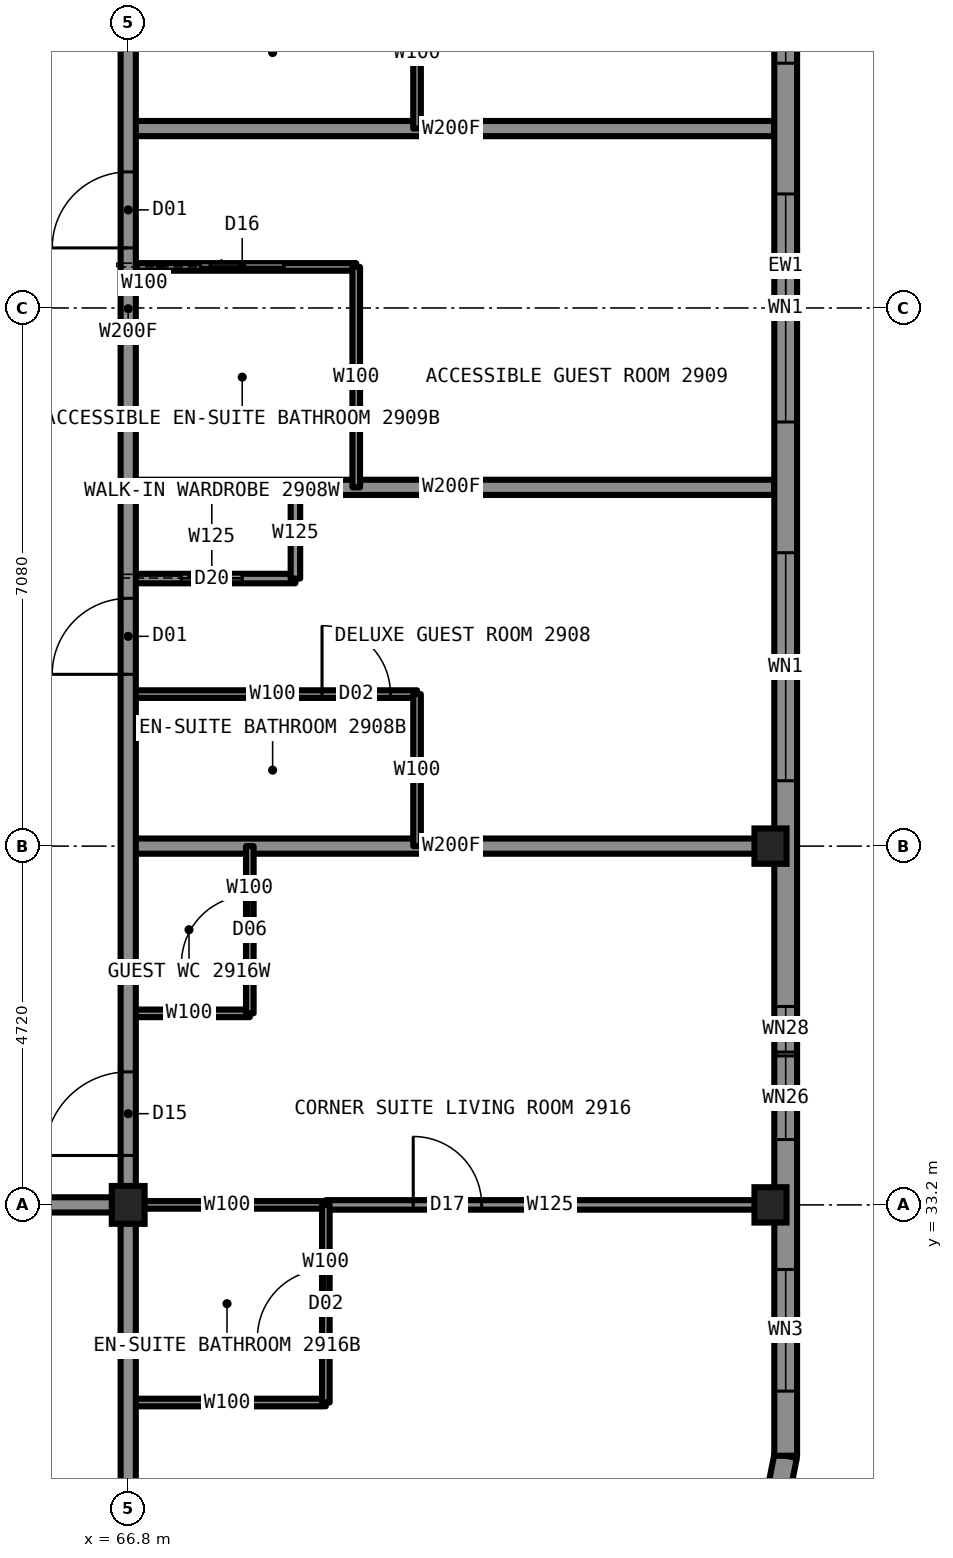
"""IFC4 building model, lengths in metres.
Left out: names, types, materials, properties, quantities, classifications, styles, units other than length and angle.
Written with IfcOpenShell. Run it as: python <this file> out.ifc"""

import sys

from ifc_helpers import new_model, si_unit, direction, frame, frame_2d, origin, origin_2d, place, context, subcontext, project, spatial, rectangle, i_section, extrude, element, fill, save


model = new_model("IFC4")
c1 = context("Model", 3, precision=1e-05, world=origin(), true_north=direction((0.0, 1.0)))
c2 = subcontext(c1, "Body", "Model", "MODEL_VIEW")
j1 = project(units=[si_unit("LENGTHUNIT", "METRE"), si_unit("PLANEANGLEUNIT", "RADIAN")], contexts=[c1])
p1 = place(None, origin())
s1 = spatial("IfcSite", under=j1, at=p1, CompositionType="ELEMENT")
p2 = place(p1, origin())
s2 = spatial("IfcBuilding", under=s1, at=p2, CompositionType="ELEMENT")
p3 = place(p2, frame((0.0, 0.0, 103.9)))
s3 = spatial("IfcBuildingStorey", under=s2, at=p3, CompositionType="ELEMENT", Elevation=103.9)
for number, where, z_axis, x_axis in (
    (1, (75.25, 33.2, 0.0), (0.0, 0.0, 1.0), (1.0, 0.0, 0.0)),
    (2, (75.25, 37.92, 0.0), (0.0, 0.0, 1.0), (1.0, 0.0, 0.0)),
):
    element("IfcColumn", number, at=place(p3, frame(where, z_axis=z_axis, x_axis=x_axis)), inside=s3, PredefinedType="COLUMN", context=c2, shape_type="SweptSolid", body=[
        extrude(i_section(OverallWidth=0.422, OverallDepth=0.465, WebThickness=0.045, FlangeThickness=0.073, at=origin_2d()), origin(), (0.0, 0.0, 1.0), 3.5),
    ])
p4 = place(p3, frame((66.8, 33.2, 0.0), z_axis=(0.0, 0.0, 1.0), x_axis=(1.0, 0.0, 0.0)))
e3 = element("IfcColumn", 3, at=p4, inside=s3, PredefinedType="COLUMN", context=c2, shape_type="SweptSolid", body=[
    extrude(i_section(OverallWidth=0.432, OverallDepth=0.498, WebThickness=0.056, FlangeThickness=0.089, at=origin_2d()), origin(), (0.0, 0.0, 1.0), 3.5),
])
p5 = place(p3, frame((66.8, 33.2, 0.0), z_axis=(0.0, 0.0, 1.0), x_axis=(1.0, 0.0, 0.0)))
e4 = element("IfcWall", 4, at=p5, inside=s3, PredefinedType="PARTITIONING", context=c2, shape_type="SweptSolid", body=[
    extrude(rectangle(XDim=2.6, YDim=0.1, at=frame_2d((1.3, 0.0))), origin(), (0.0, 0.0, 1.0), 2.573),
])
p6 = place(p3, frame((43.2, 33.2, 0.0), z_axis=(0.0, 0.0, 1.0), x_axis=(1.0, 0.0, 0.0)))
e5 = element("IfcWall", 5, at=p6, inside=s3, PredefinedType="PARTITIONING", context=c2, shape_type="SweptSolid", body=[
    extrude(rectangle(XDim=23.6, YDim=0.2, at=frame_2d((11.8, 0.0))), origin(), (0.0, 0.0, 1.0), 3.33),
])
p7 = place(p6, frame((3.0, 0.0, 0.0)))
e6 = element("IfcOpeningElement", 6, at=p7, cuts=e5, PredefinedType="OPENING", context=c2, shape_type="SweptSolid", body=[
    extrude(rectangle(XDim=1.0, YDim=2.2, at=frame_2d((0.5, 1.1))), frame((0.0, 0.11, 0.0), z_axis=(0.0, -1.0, 0.0), x_axis=(1.0, 0.0, 0.0)), (0.0, 0.0, 1.0), 0.22),
])
p8 = place(p6, frame((12.44, 0.0, 0.0)))
e7 = element("IfcOpeningElement", 7, at=p8, cuts=e5, PredefinedType="OPENING", context=c2, shape_type="SweptSolid", body=[
    extrude(rectangle(XDim=1.0, YDim=2.2, at=frame_2d((0.5, 1.1))), frame((0.0, 0.11, 0.0), z_axis=(0.0, -1.0, 0.0), x_axis=(1.0, 0.0, 0.0)), (0.0, 0.0, 1.0), 0.22),
])
p9 = place(p6, frame((21.43, 0.0, 0.0)))
e8 = element("IfcOpeningElement", 8, at=p9, cuts=e5, PredefinedType="OPENING", context=c2, shape_type="SweptSolid", body=[
    extrude(rectangle(XDim=1.0, YDim=2.2, at=frame_2d((0.5, 1.1))), frame((0.0, 0.11, 0.0), z_axis=(0.0, -1.0, 0.0), x_axis=(1.0, 0.0, 0.0)), (0.0, 0.0, 1.0), 0.22),
])
p10 = place(p3, frame((69.4, 33.2, 0.0), z_axis=(0.0, 0.0, 1.0), x_axis=(1.0, 0.0, 0.0)))
e9 = element("IfcWall", 9, at=p10, inside=s3, PredefinedType="PARTITIONING", context=c2, shape_type="SweptSolid", body=[
    extrude(rectangle(XDim=5.9, YDim=0.125, at=frame_2d((2.95, 0.0))), origin(), (0.0, 0.0, 1.0), 2.573),
])
p11 = place(p10, frame((1.15, 0.0, 0.0)))
e10 = element("IfcOpeningElement", 10, at=p11, cuts=e9, PredefinedType="OPENING", context=c2, shape_type="SweptSolid", body=[
    extrude(rectangle(XDim=0.9, YDim=2.2, at=frame_2d((0.45, 1.1))), frame((0.0, 0.073, 0.0), z_axis=(0.0, -1.0, 0.0), x_axis=(1.0, 0.0, 0.0)), (0.0, 0.0, 1.0), 0.145),
])
p12 = place(p3, frame((66.8, 30.6, 0.0), z_axis=(0.0, 0.0, 1.0), x_axis=(1.0, 0.0, 0.0)))
e11 = element("IfcWall", 11, at=p12, inside=s3, PredefinedType="PARTITIONING", context=c2, shape_type="SweptSolid", body=[
    extrude(rectangle(XDim=2.6, YDim=0.1, at=frame_2d((1.3, 0.0))), origin(), (0.0, 0.0, 1.0), 3.33),
])
p13 = place(p3, frame((66.8, 42.64, 0.0), z_axis=(0.0, 0.0, 1.0), x_axis=(1.0, 0.0, 0.0)))
e12 = element("IfcWall", 12, at=p13, inside=s3, PredefinedType="PARTITIONING", context=c2, shape_type="SweptSolid", body=[
    extrude(rectangle(XDim=8.5, YDim=0.2, at=frame_2d((4.25, 0.0))), origin(), (0.0, 0.0, 1.0), 2.731),
])
p14 = place(p3, frame((66.8, 41.44, 0.0), z_axis=(0.0, 0.0, 1.0), x_axis=(1.0, 0.0, 0.0)))
e13 = element("IfcWall", 13, at=p14, inside=s3, PredefinedType="PARTITIONING", context=c2, shape_type="SweptSolid", body=[
    extrude(rectangle(XDim=2.2, YDim=0.125, at=frame_2d((1.1, 0.0))), origin(), (0.0, 0.0, 1.0), 3.33),
])
p15 = place(p14, frame((0.7, 0.0, 0.0)))
e14 = element("IfcOpeningElement", 14, at=p15, cuts=e13, PredefinedType="OPENING", context=c2, shape_type="SweptSolid", body=[
    extrude(rectangle(XDim=0.8, YDim=2.1, at=frame_2d((0.4, 1.05))), frame((0.0, 0.073, 0.0), z_axis=(0.0, -1.0, 0.0), x_axis=(1.0, 0.0, 0.0)), (0.0, 0.0, 1.0), 0.145),
])
p16 = place(p3, frame((66.8, 39.92, 0.0), z_axis=(0.0, 0.0, 1.0), x_axis=(1.0, 0.0, 0.0)))
e15 = element("IfcWall", 15, at=p16, inside=s3, PredefinedType="PARTITIONING", context=c2, shape_type="SweptSolid", body=[
    extrude(rectangle(XDim=3.8, YDim=0.1, at=frame_2d((1.9, 0.0))), origin(), (0.0, 0.0, 1.0), 3.33),
])
p17 = place(p16, frame((2.55, 0.0, 0.0)))
e16 = element("IfcOpeningElement", 16, at=p17, cuts=e15, PredefinedType="OPENING", context=c2, shape_type="SweptSolid", body=[
    extrude(rectangle(XDim=0.9, YDim=2.1, at=frame_2d((0.45, 1.05))), frame((0.0, 0.06, 0.0), z_axis=(0.0, -1.0, 0.0), x_axis=(1.0, 0.0, 0.0)), (0.0, 0.0, 1.0), 0.12),
])
p18 = place(p3, frame((66.8, 37.92, 0.0), z_axis=(0.0, 0.0, 1.0), x_axis=(1.0, 0.0, 0.0)))
e17 = element("IfcWall", 17, at=p18, inside=s3, PredefinedType="PARTITIONING", context=c2, shape_type="SweptSolid", body=[
    extrude(rectangle(XDim=8.5, YDim=0.2, at=frame_2d((4.25, 0.0))), origin(), (0.0, 0.0, 1.0), 2.573),
])
p19 = place(p3, frame((66.8, 35.72, 0.0), z_axis=(0.0, 0.0, 1.0), x_axis=(1.0, 0.0, 0.0)))
e18 = element("IfcWall", 18, at=p19, inside=s3, PredefinedType="PARTITIONING", context=c2, shape_type="SweptSolid", body=[
    extrude(rectangle(XDim=1.6, YDim=0.1, at=frame_2d((0.8, 0.0))), origin(), (0.0, 0.0, 1.0), 3.33),
])
p20 = place(p3, frame((66.8, 45.54, 0.0), z_axis=(0.0, 0.0, 1.0), x_axis=(1.0, 0.0, 0.0)))
e19 = element("IfcWall", 19, at=p20, inside=s3, PredefinedType="PARTITIONING", context=c2, shape_type="SweptSolid", body=[
    extrude(rectangle(XDim=3.0, YDim=0.1, at=frame_2d((1.5, 0.0))), origin(), (0.0, 0.0, 1.0), 3.33),
])
p21 = place(p20, frame((0.95, 0.0, 0.0)))
e20 = element("IfcOpeningElement", 20, at=p21, cuts=e19, PredefinedType="OPENING", context=c2, shape_type="SweptSolid", body=[
    extrude(rectangle(XDim=1.1, YDim=2.1, at=frame_2d((0.55, 1.05))), frame((0.0, 0.06, 0.0), z_axis=(0.0, -1.0, 0.0), x_axis=(1.0, 0.0, 0.0)), (0.0, 0.0, 1.0), 0.12),
])
p22 = place(p3, frame((66.8, 47.36, 0.0), z_axis=(0.0, 0.0, 1.0), x_axis=(1.0, 0.0, 0.0)))
e21 = element("IfcWall", 21, at=p22, inside=s3, PredefinedType="PARTITIONING", context=c2, shape_type="SweptSolid", body=[
    extrude(rectangle(XDim=8.5, YDim=0.2, at=frame_2d((4.25, 0.0))), origin(), (0.0, 0.0, 1.0), 2.731),
])
p23 = place(p3, frame((66.8, 33.2, 0.0), z_axis=(0.0, 0.0, 1.0), x_axis=(0.0, 1.0, 0.0)))
e22 = element("IfcWall", 22, at=p23, inside=s3, PredefinedType="PARTITIONING", context=c2, shape_type="SweptSolid", body=[
    extrude(rectangle(XDim=23.58, YDim=0.2, at=frame_2d((11.79, 0.0))), origin(), (0.0, 0.0, 1.0), 3.33),
])
p24 = place(p23, frame((6.98, 0.0, 0.0)))
e23 = element("IfcOpeningElement", 23, at=p24, cuts=e22, PredefinedType="OPENING", context=c2, shape_type="SweptSolid", body=[
    extrude(rectangle(XDim=1.0, YDim=2.2, at=frame_2d((0.5, 1.1))), frame((0.0, 0.11, 0.0), z_axis=(0.0, -1.0, 0.0), x_axis=(1.0, 0.0, 0.0)), (0.0, 0.0, 1.0), 0.22),
])
p25 = place(p23, frame((12.59, 0.0, 0.0)))
e24 = element("IfcOpeningElement", 24, at=p25, cuts=e22, PredefinedType="OPENING", context=c2, shape_type="SweptSolid", body=[
    extrude(rectangle(XDim=1.0, YDim=2.2, at=frame_2d((0.5, 1.1))), frame((0.0, 0.11, 0.0), z_axis=(0.0, -1.0, 0.0), x_axis=(1.0, 0.0, 0.0)), (0.0, 0.0, 1.0), 0.22),
])
p26 = place(p23, frame((16.42, 0.0, 0.0)))
e25 = element("IfcOpeningElement", 25, at=p26, cuts=e22, PredefinedType="OPENING", context=c2, shape_type="SweptSolid", body=[
    extrude(rectangle(XDim=1.0, YDim=2.2, at=frame_2d((0.5, 1.1))), frame((0.0, 0.11, 0.0), z_axis=(0.0, -1.0, 0.0), x_axis=(1.0, 0.0, 0.0)), (0.0, 0.0, 1.0), 0.22),
])
p27 = place(p23, frame((21.85, 0.0, 0.0)))
e26 = element("IfcOpeningElement", 26, at=p27, cuts=e22, PredefinedType="OPENING", context=c2, shape_type="SweptSolid", body=[
    extrude(rectangle(XDim=1.1, YDim=2.2, at=frame_2d((0.55, 1.1))), frame((0.0, 0.11, 0.0), z_axis=(0.0, -1.0, 0.0), x_axis=(1.0, 0.0, 0.0)), (0.0, 0.0, 1.0), 0.22),
])
p28 = place(p23, frame((0.65, 0.0, 0.0)))
e27 = element("IfcOpeningElement", 27, at=p28, cuts=e22, PredefinedType="OPENING", context=c2, shape_type="SweptSolid", body=[
    extrude(rectangle(XDim=1.1, YDim=2.2, at=frame_2d((0.55, 1.1))), frame((0.0, 0.11, 0.0), z_axis=(0.0, -1.0, 0.0), x_axis=(1.0, 0.0, 0.0)), (0.0, 0.0, 1.0), 0.22),
])
p29 = place(p3, frame((66.8, 24.7, 0.0), z_axis=(0.0, 0.0, 1.0), x_axis=(0.0, 1.0, 0.0)))
e28 = element("IfcWall", 28, at=p29, inside=s3, PredefinedType="PARTITIONING", context=c2, shape_type="SweptSolid", body=[
    extrude(rectangle(XDim=8.5, YDim=0.2, at=frame_2d((4.25, 0.0))), origin(), (0.0, 0.0, 1.0), 2.573),
])
p30 = place(p3, frame((68.4, 35.72, 0.0), z_axis=(0.0, 0.0, 1.0), x_axis=(0.0, 1.0, 0.0)))
e29 = element("IfcWall", 29, at=p30, inside=s3, PredefinedType="PARTITIONING", context=c2, shape_type="SweptSolid", body=[
    extrude(rectangle(XDim=2.2, YDim=0.1, at=frame_2d((1.1, 0.0))), origin(), (0.0, 0.0, 1.0), 3.33),
])
p31 = place(p30, frame((0.65, 0.0, 0.0)))
e30 = element("IfcOpeningElement", 30, at=p31, cuts=e29, PredefinedType="OPENING", context=c2, shape_type="SweptSolid", body=[
    extrude(rectangle(XDim=0.9, YDim=2.1, at=frame_2d((0.45, 1.05))), frame((0.0, 0.06, 0.0), z_axis=(0.0, -1.0, 0.0), x_axis=(1.0, 0.0, 0.0)), (0.0, 0.0, 1.0), 0.12),
])
p32 = place(p3, frame((69.0, 41.44, 0.0), z_axis=(0.0, 0.0, 1.0), x_axis=(0.0, 1.0, 0.0)))
e31 = element("IfcWall", 31, at=p32, inside=s3, PredefinedType="PARTITIONING", context=c2, shape_type="SweptSolid", body=[
    extrude(rectangle(XDim=1.2, YDim=0.125, at=frame_2d((0.6, 0.0))), origin(), (0.0, 0.0, 1.0), 3.33),
])
p33 = place(p3, frame((69.4, 30.6, 0.0), z_axis=(0.0, 0.0, 1.0), x_axis=(0.0, 1.0, 0.0)))
e32 = element("IfcWall", 32, at=p33, inside=s3, PredefinedType="PARTITIONING", context=c2, shape_type="SweptSolid", body=[
    extrude(rectangle(XDim=2.6, YDim=0.1, at=frame_2d((1.3, 0.0))), origin(), (0.0, 0.0, 1.0), 3.33),
])
p34 = place(p33, frame((0.85, 0.0, 0.0)))
e33 = element("IfcOpeningElement", 33, at=p34, cuts=e32, PredefinedType="OPENING", context=c2, shape_type="SweptSolid", body=[
    extrude(rectangle(XDim=0.9, YDim=2.1, at=frame_2d((0.45, 1.05))), frame((0.0, 0.06, 0.0), z_axis=(0.0, -1.0, 0.0), x_axis=(1.0, 0.0, 0.0)), (0.0, 0.0, 1.0), 0.12),
])
p35 = place(p3, frame((69.8, 42.64, 0.0), z_axis=(0.0, 0.0, 1.0), x_axis=(0.0, 1.0, 0.0)))
e34 = element("IfcWall", 34, at=p35, inside=s3, PredefinedType="PARTITIONING", context=c2, shape_type="SweptSolid", body=[
    extrude(rectangle(XDim=2.9, YDim=0.1, at=frame_2d((1.45, 0.0))), origin(), (0.0, 0.0, 1.0), 3.33),
])
for number, where, z_axis, x_axis in (
    (35, (70.6, 37.92, 0.0), (0.0, 0.0, 1.0), (0.0, 1.0, 0.0)),
    (36, (70.6, 47.36, 0.0), (0.0, 0.0, 1.0), (0.0, 1.0, 0.0)),
):
    element("IfcWall", number, at=place(p3, frame(where, z_axis=z_axis, x_axis=x_axis)), inside=s3, PredefinedType="PARTITIONING", context=c2, shape_type="SweptSolid", body=[
        extrude(rectangle(XDim=2.0, YDim=0.1, at=frame_2d((1.0, 0.0))), origin(), (0.0, 0.0, 1.0), 3.33),
    ])
p36 = place(p3, frame((75.043, 27.853, 0.0), z_axis=(0.0, 0.0, 1.0), x_axis=(0.195081421501, 0.980787050784, 0.0)))
e37 = element("IfcWall", 37, at=p36, inside=s3, PredefinedType="SOLIDWALL", context=c2, shape_type="SweptSolid", body=[
    extrude(rectangle(XDim=2.087, YDim=0.3, at=frame_2d((1.044, 0.0))), origin(), (0.0, 0.0, 1.0), 3.33),
])
p37 = place(p36, frame((0.444, 0.0, 0.5)))
e38 = element("IfcOpeningElement", 38, at=p37, cuts=e37, PredefinedType="OPENING", context=c2, shape_type="SweptSolid", body=[
    extrude(rectangle(XDim=1.2, YDim=2.0, at=frame_2d((0.6, 1.0))), frame((0.0, 0.16, 0.0), z_axis=(0.0, -1.0, 0.0), x_axis=(1.0, 0.0, 0.0)), (0.0, 0.0, 1.0), 0.32),
])
p38 = place(p3, frame((75.45, 29.9, 0.0), z_axis=(0.0, 0.0, 1.0), x_axis=(0.0, 1.0, 0.0)))
e39 = element("IfcWall", 39, at=p38, inside=s3, PredefinedType="SOLIDWALL", context=c2, shape_type="SweptSolid", body=[
    extrude(rectangle(XDim=30.2, YDim=0.3, at=frame_2d((15.1, 0.0))), origin(), (0.0, 0.0, 1.0), 2.83),
])
p39 = place(p38, frame((4.16, 0.0, 0.5)))
e40 = element("IfcOpeningElement", 40, at=p39, cuts=e39, PredefinedType="OPENING", context=c2, shape_type="SweptSolid", body=[
    extrude(rectangle(XDim=3.0, YDim=2.0, at=frame_2d((1.5, 1.0))), frame((0.0, 0.16, 0.0), z_axis=(0.0, -1.0, 0.0), x_axis=(1.0, 0.0, 0.0)), (0.0, 0.0, 1.0), 0.32),
])
p40 = place(p38, frame((8.88, 0.0, 0.5)))
e41 = element("IfcOpeningElement", 41, at=p40, cuts=e39, PredefinedType="OPENING", context=c2, shape_type="SweptSolid", body=[
    extrude(rectangle(XDim=3.0, YDim=2.0, at=frame_2d((1.5, 1.0))), frame((0.0, 0.16, 0.0), z_axis=(0.0, -1.0, 0.0), x_axis=(1.0, 0.0, 0.0)), (0.0, 0.0, 1.0), 0.32),
])
p41 = place(p38, frame((13.6, 0.0, 0.5)))
e42 = element("IfcOpeningElement", 42, at=p41, cuts=e39, PredefinedType="OPENING", context=c2, shape_type="SweptSolid", body=[
    extrude(rectangle(XDim=3.0, YDim=2.0, at=frame_2d((1.5, 1.0))), frame((0.0, 0.16, 0.0), z_axis=(0.0, -1.0, 0.0), x_axis=(1.0, 0.0, 0.0)), (0.0, 0.0, 1.0), 0.32),
])
p42 = place(p38, frame((18.32, 0.0, 0.5)))
e43 = element("IfcOpeningElement", 43, at=p42, cuts=e39, PredefinedType="OPENING", context=c2, shape_type="SweptSolid", body=[
    extrude(rectangle(XDim=3.0, YDim=2.0, at=frame_2d((1.5, 1.0))), frame((0.0, 0.16, 0.0), z_axis=(0.0, -1.0, 0.0), x_axis=(1.0, 0.0, 0.0)), (0.0, 0.0, 1.0), 0.32),
])
p43 = place(p38, frame((23.04, 0.0, 0.5)))
e44 = element("IfcOpeningElement", 44, at=p43, cuts=e39, PredefinedType="OPENING", context=c2, shape_type="SweptSolid", body=[
    extrude(rectangle(XDim=3.0, YDim=2.0, at=frame_2d((1.5, 1.0))), frame((0.0, 0.16, 0.0), z_axis=(0.0, -1.0, 0.0), x_axis=(1.0, 0.0, 0.0)), (0.0, 0.0, 1.0), 0.32),
])
p44 = place(p24, origin())
e45 = element("IfcDoor", 45, at=p44, inside=s3, OperationType="SINGLE_SWING_LEFT", PredefinedType="DOOR", context=c2, shape_type="SweptSolid", body=[
    extrude(rectangle(XDim=1.0, YDim=2.2, at=frame_2d((0.5, 1.1))), frame((0.0, 0.025, 0.0), z_axis=(0.0, -1.0, 0.0), x_axis=(1.0, 0.0, 0.0)), (0.0, 0.0, 1.0), 0.05),
])
fill(e23, e45)
p45 = place(p17, origin())
e46 = element("IfcDoor", 46, at=p45, inside=s3, OperationType="SINGLE_SWING_RIGHT", PredefinedType="DOOR", context=c2, shape_type="SweptSolid", body=[
    extrude(rectangle(XDim=0.9, YDim=2.1, at=frame_2d((0.45, 1.05))), frame((0.0, 0.025, 0.0), z_axis=(0.0, -1.0, 0.0), x_axis=(1.0, 0.0, 0.0)), (0.0, 0.0, 1.0), 0.05),
])
fill(e16, e46)
p46 = place(p15, origin())
e47 = element("IfcDoor", 47, at=p46, inside=s3, OperationType="SLIDING_TO_LEFT", PredefinedType="DOOR", context=c2, shape_type="SweptSolid", body=[
    extrude(rectangle(XDim=0.8, YDim=2.1, at=frame_2d((0.4, 1.05))), frame((0.0, 0.025, 0.0), z_axis=(0.0, -1.0, 0.0), x_axis=(1.0, 0.0, 0.0)), (0.0, 0.0, 1.0), 0.05),
])
fill(e14, e47)
p47 = place(p25, origin())
e48 = element("IfcDoor", 48, at=p47, inside=s3, OperationType="SINGLE_SWING_LEFT", PredefinedType="DOOR", context=c2, shape_type="SweptSolid", body=[
    extrude(rectangle(XDim=1.0, YDim=2.2, at=frame_2d((0.5, 1.1))), frame((0.0, 0.025, 0.0), z_axis=(0.0, -1.0, 0.0), x_axis=(1.0, 0.0, 0.0)), (0.0, 0.0, 1.0), 0.05),
])
fill(e24, e48)
p48 = place(p21, origin())
e49 = element("IfcDoor", 49, at=p48, inside=s3, OperationType="SLIDING_TO_LEFT", PredefinedType="DOOR", context=c2, shape_type="SweptSolid", body=[
    extrude(rectangle(XDim=1.1, YDim=2.1, at=frame_2d((0.55, 1.05))), frame((0.0, 0.025, 0.0), z_axis=(0.0, -1.0, 0.0), x_axis=(1.0, 0.0, 0.0)), (0.0, 0.0, 1.0), 0.05),
])
fill(e20, e49)
p49 = place(p28, origin())
e50 = element("IfcDoor", 50, at=p49, inside=s3, OperationType="SINGLE_SWING_LEFT", PredefinedType="DOOR", context=c2, shape_type="SweptSolid", body=[
    extrude(rectangle(XDim=1.1, YDim=2.2, at=frame_2d((0.55, 1.1))), frame((0.0, 0.025, 0.0), z_axis=(0.0, -1.0, 0.0), x_axis=(1.0, 0.0, 0.0)), (0.0, 0.0, 1.0), 0.05),
])
fill(e27, e50)
p50 = place(p34, origin())
e51 = element("IfcDoor", 51, at=p50, inside=s3, OperationType="SINGLE_SWING_RIGHT", PredefinedType="DOOR", context=c2, shape_type="SweptSolid", body=[
    extrude(rectangle(XDim=0.9, YDim=2.1, at=frame_2d((0.45, 1.05))), frame((0.0, 0.025, 0.0), z_axis=(0.0, -1.0, 0.0), x_axis=(1.0, 0.0, 0.0)), (0.0, 0.0, 1.0), 0.05),
])
fill(e33, e51)
p51 = place(p11, origin())
e52 = element("IfcDoor", 52, at=p51, inside=s3, OperationType="SINGLE_SWING_LEFT", PredefinedType="DOOR", context=c2, shape_type="SweptSolid", body=[
    extrude(rectangle(XDim=0.9, YDim=2.2, at=frame_2d((0.45, 1.1))), frame((0.0, 0.025, 0.0), z_axis=(0.0, -1.0, 0.0), x_axis=(1.0, 0.0, 0.0)), (0.0, 0.0, 1.0), 0.05),
])
fill(e10, e52)
p52 = place(p31, origin())
e53 = element("IfcDoor", 53, at=p52, inside=s3, OperationType="SINGLE_SWING_LEFT", PredefinedType="DOOR", context=c2, shape_type="SweptSolid", body=[
    extrude(rectangle(XDim=0.9, YDim=2.1, at=frame_2d((0.45, 1.05))), frame((0.0, 0.025, 0.0), z_axis=(0.0, -1.0, 0.0), x_axis=(1.0, 0.0, 0.0)), (0.0, 0.0, 1.0), 0.05),
])
fill(e30, e53)
p53 = place(p39, origin())
e54 = element("IfcWindow", 54, at=p53, inside=s3, PartitioningType="SINGLE_PANEL", PredefinedType="WINDOW", context=c2, shape_type="SweptSolid", body=[
    extrude(rectangle(XDim=3.0, YDim=2.0, at=frame_2d((1.5, 1.0))), frame((0.0, 0.03, 0.0), z_axis=(0.0, -1.0, 0.0), x_axis=(1.0, 0.0, 0.0)), (0.0, 0.0, 1.0), 0.06),
])
fill(e40, e54)
p54 = place(p40, origin())
e55 = element("IfcWindow", 55, at=p54, inside=s3, PartitioningType="SINGLE_PANEL", PredefinedType="WINDOW", context=c2, shape_type="SweptSolid", body=[
    extrude(rectangle(XDim=3.0, YDim=2.0, at=frame_2d((1.5, 1.0))), frame((0.0, 0.03, 0.0), z_axis=(0.0, -1.0, 0.0), x_axis=(1.0, 0.0, 0.0)), (0.0, 0.0, 1.0), 0.06),
])
fill(e41, e55)
p55 = place(p41, origin())
e56 = element("IfcWindow", 56, at=p55, inside=s3, PartitioningType="SINGLE_PANEL", PredefinedType="WINDOW", context=c2, shape_type="SweptSolid", body=[
    extrude(rectangle(XDim=3.0, YDim=2.0, at=frame_2d((1.5, 1.0))), frame((0.0, 0.03, 0.0), z_axis=(0.0, -1.0, 0.0), x_axis=(1.0, 0.0, 0.0)), (0.0, 0.0, 1.0), 0.06),
])
fill(e42, e56)
p56 = place(p42, origin())
e57 = element("IfcWindow", 57, at=p56, inside=s3, PartitioningType="SINGLE_PANEL", PredefinedType="WINDOW", context=c2, shape_type="SweptSolid", body=[
    extrude(rectangle(XDim=3.0, YDim=2.0, at=frame_2d((1.5, 1.0))), frame((0.0, 0.03, 0.0), z_axis=(0.0, -1.0, 0.0), x_axis=(1.0, 0.0, 0.0)), (0.0, 0.0, 1.0), 0.06),
])
fill(e43, e57)
save(model, sys.argv[1])
